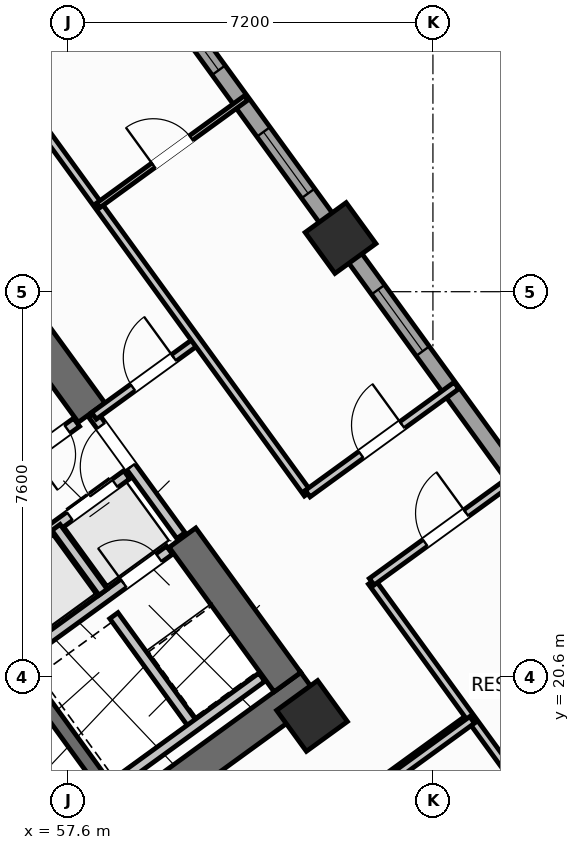
"""IFC4 building model, lengths in metres.
Left out: names, types, materials, properties, quantities, classifications, styles, units other than length and angle.
Written with IfcOpenShell. Run it as: python <this file> out.ifc"""

import sys

from ifc_helpers import new_model, si_unit, direction, frame, frame_2d, origin, origin_2d, place, context, subcontext, project, spatial, rectangle, hollow_rectangle, extrude, source, transform, mapped, element, fill, save


model = new_model("IFC4")
c1 = context("Model", 3, precision=1e-05, world=origin(), true_north=direction((0.0, 1.0)))
c2 = subcontext(c1, "Body", "Model", "MODEL_VIEW")
j1 = project(units=[si_unit("LENGTHUNIT", "METRE"), si_unit("PLANEANGLEUNIT", "RADIAN")], contexts=[c1])
p1 = place(None, origin())
s1 = spatial("IfcSite", under=j1, at=p1, CompositionType="ELEMENT")
p2 = place(p1, origin())
s2 = spatial("IfcBuilding", under=s1, at=p2, CompositionType="ELEMENT")
p3 = place(p2, frame((0.0, 0.0, 49.2)))
s3 = spatial("IfcBuildingStorey", under=s2, at=p3, CompositionType="ELEMENT", Elevation=49.2)
p4 = place(p3, frame((52.318, 13.11, 0.0), z_axis=(0.0, 0.0, 1.0), x_axis=(0.809019445368, 0.587781878776, 0.0)))
e1 = element("IfcWall", 1, at=p4, inside=s3, PredefinedType="SHEAR", context=c2, shape_type="SweptSolid", body=[
    extrude(rectangle(XDim=12.44, YDim=0.65, at=frame_2d((6.22, 0.0))), origin(), (0.0, 0.0, 1.0), 3.35),
])
p5 = place(p3, frame((61.929, 20.494, 0.0), z_axis=(0.0, 0.0, 1.0), x_axis=(-0.58782982593, 0.808984607855, 0.0)))
e2 = element("IfcWall", 2, at=p5, inside=s3, PredefinedType="SHEAR", context=c2, shape_type="SweptSolid", body=[
    extrude(rectangle(XDim=3.525, YDim=0.65, at=frame_2d((1.762, 0.0))), origin(), (0.0, 0.0, 1.0), 3.35),
])
p6 = place(p3, frame((58.064, 25.813, 0.0), z_axis=(0.0, 0.0, 1.0), x_axis=(-0.58777996584, 0.809020835181, 0.0)))
e3 = element("IfcWall", 3, at=p6, inside=s3, PredefinedType="SHEAR", context=c2, shape_type="SweptSolid", body=[
    extrude(rectangle(XDim=6.375, YDim=0.65, at=frame_2d((3.188, 0.0))), origin(), (0.0, 0.0, 1.0), 3.35),
])
m1 = source(origin(), c2, "Body", "SweptSolid", [
    extrude(hollow_rectangle(XDim=1.0, YDim=1.0, WallThickness=0.04, at=origin_2d()), origin(), (0.0, 0.0, 1.0), 3.6),
])
for number, where, z_axis, x_axis in (
    (4, (62.414, 19.827, 0.0), (0.0, 0.0, 1.0), (0.809, 0.588, 0.0)),
    (5, (62.977, 29.259, 0.0), (0.0, 0.0, 1.0), (0.809, 0.588, 0.0)),
):
    element("IfcColumn", number, at=place(p3, frame(where, z_axis=z_axis, x_axis=x_axis)), inside=s3, PredefinedType="COLUMN", context=c2, shape_type="MappedRepresentation", body=[
        mapped(m1, transform((0.0, 0.0, 0.0), scale=1.0)),
    ])
p7 = place(p3, frame((43.938, 25.192, 0.0), z_axis=(0.0, 0.0, 1.0), x_axis=(0.809016324578, 0.587786174187, 0.0)))
e6 = element("IfcWall", 6, at=p7, inside=s3, PredefinedType="STANDARD", context=c2, shape_type="SweptSolid", body=[
    extrude(rectangle(XDim=17.587, YDim=0.32, at=frame_2d((8.794, 0.0))), origin(), (0.0, 0.0, 1.0), 3.35),
])
p8 = place(p7, frame((14.914, 0.0, 0.0)))
e7 = element("IfcOpeningElement", 7, at=p8, cuts=e6, PredefinedType="OPENING", context=c2, shape_type="SweptSolid", body=[
    extrude(rectangle(XDim=1.05, YDim=2.15, at=frame_2d((0.525, 1.075))), frame((0.0, 0.17, 0.0), z_axis=(0.0, -1.0, 0.0), x_axis=(1.0, 0.0, 0.0)), (0.0, 0.0, 1.0), 0.34),
])
p9 = place(p7, frame((2.169, 0.0, 0.8)))
e8 = element("IfcOpeningElement", 8, at=p9, cuts=e6, PredefinedType="OPENING", context=c2, shape_type="SweptSolid", body=[
    extrude(rectangle(XDim=2.1, YDim=1.55, at=frame_2d((1.05, 0.775))), frame((0.0, 0.17, 0.0), z_axis=(0.0, -1.0, 0.0), x_axis=(1.0, 0.0, 0.0)), (0.0, 0.0, 1.0), 0.34),
])
p10 = place(p7, frame((7.319, 0.0, 0.8)))
e9 = element("IfcOpeningElement", 9, at=p10, cuts=e6, PredefinedType="OPENING", context=c2, shape_type="SweptSolid", body=[
    extrude(rectangle(XDim=2.1, YDim=1.55, at=frame_2d((1.05, 0.775))), frame((0.0, 0.17, 0.0), z_axis=(0.0, -1.0, 0.0), x_axis=(1.0, 0.0, 0.0)), (0.0, 0.0, 1.0), 0.34),
])
p11 = place(p3, frame((58.455, 35.484, 0.0), z_axis=(0.0, 0.0, 1.0), x_axis=(0.587783625747, -0.809018176127, 0.0)))
e10 = element("IfcWall", 10, at=p11, inside=s3, PredefinedType="STANDARD", context=c2, shape_type="SweptSolid", body=[
    extrude(rectangle(XDim=21.587, YDim=0.32, at=frame_2d((10.794, 0.0))), origin(), (0.0, 0.0, 1.0), 2.725),
])
p12 = place(p11, frame((1.5, 0.0, 0.8)))
e11 = element("IfcOpeningElement", 11, at=p12, cuts=e10, PredefinedType="OPENING", context=c2, shape_type="SweptSolid", body=[
    extrude(rectangle(XDim=2.1, YDim=1.55, at=frame_2d((1.05, 0.775))), frame((0.0, 0.17, 0.0), z_axis=(0.0, -1.0, 0.0), x_axis=(1.0, 0.0, 0.0)), (0.0, 0.0, 1.0), 0.34),
])
p13 = place(p11, frame((5.105, 0.0, 0.85)))
e12 = element("IfcOpeningElement", 12, at=p13, cuts=e10, PredefinedType="OPENING", context=c2, shape_type="SweptSolid", body=[
    extrude(rectangle(XDim=1.5, YDim=1.5, at=frame_2d((0.75, 0.75))), frame((0.0, 0.17, 0.0), z_axis=(0.0, -1.0, 0.0), x_axis=(1.0, 0.0, 0.0)), (0.0, 0.0, 1.0), 0.34),
])
p14 = place(p11, frame((8.954, 0.0, 0.85)))
e13 = element("IfcOpeningElement", 13, at=p14, cuts=e10, PredefinedType="OPENING", context=c2, shape_type="SweptSolid", body=[
    extrude(rectangle(XDim=1.5, YDim=1.5, at=frame_2d((0.75, 0.75))), frame((0.0, 0.17, 0.0), z_axis=(0.0, -1.0, 0.0), x_axis=(1.0, 0.0, 0.0)), (0.0, 0.0, 1.0), 0.34),
])
p15 = place(p11, frame((17.581, 0.0, 0.95)))
e14 = element("IfcOpeningElement", 14, at=p15, cuts=e10, PredefinedType="OPENING", context=c2, shape_type="SweptSolid", body=[
    extrude(rectangle(XDim=1.2, YDim=1.4, at=frame_2d((0.6, 0.7))), frame((0.0, 0.17, 0.0), z_axis=(0.0, -1.0, 0.0), x_axis=(1.0, 0.0, 0.0)), (0.0, 0.0, 1.0), 0.34),
])
p16 = place(p3, frame((58.41, 18.327, 0.0), z_axis=(0.0, 0.0, 1.0), x_axis=(-0.58776738483, 0.809029975545, 0.0)))
e15 = element("IfcWall", 15, at=p16, inside=s3, PredefinedType="SHEAR", context=c2, shape_type="SweptSolid", body=[
    extrude(rectangle(XDim=3.16, YDim=0.26, at=frame_2d((1.58, 0.0))), origin(), (0.0, 0.0, 1.0), 3.35),
])
p17 = place(p3, frame((56.553, 20.884, 0.0), z_axis=(0.0, 0.0, 1.0), x_axis=(0.809035789462, 0.587759382205, 0.0)))
e16 = element("IfcWall", 16, at=p17, inside=s3, PredefinedType="STANDARD", context=c2, shape_type="SweptSolid", body=[
    extrude(rectangle(XDim=3.768, YDim=0.2, at=frame_2d((1.884, 0.0))), origin(), (0.0, 0.0, 1.0), 3.34),
])
p18 = place(p17, frame((2.65, 0.0, 0.0)))
e17 = element("IfcOpeningElement", 17, at=p18, cuts=e16, PredefinedType="OPENING", context=c2, shape_type="SweptSolid", body=[
    extrude(rectangle(XDim=0.86, YDim=2.05, at=frame_2d((0.43, 1.025))), frame((0.0, 0.11, 0.0), z_axis=(0.0, -1.0, 0.0), x_axis=(1.0, 0.0, 0.0)), (0.0, 0.0, 1.0), 0.22),
])
p19 = place(p3, frame((54.421, 21.436, 0.0), z_axis=(0.0, 0.0, 1.0), x_axis=(0.809013710463, 0.587789772183, 0.0)))
e18 = element("IfcWall", 18, at=p19, inside=s3, PredefinedType="STANDARD", context=c2, shape_type="SweptSolid", body=[
    extrude(rectangle(XDim=5.36, YDim=0.2, at=frame_2d((2.68, 0.0))), origin(), (0.0, 0.0, 1.0), 3.34),
])
p20 = place(p19, frame((0.37, 0.0, 0.0)))
e19 = element("IfcOpeningElement", 19, at=p20, cuts=e18, PredefinedType="OPENING", context=c2, shape_type="SweptSolid", body=[
    extrude(rectangle(XDim=1.1, YDim=2.15, at=frame_2d((0.55, 1.075))), frame((0.0, 0.11, 0.0), z_axis=(0.0, -1.0, 0.0), x_axis=(1.0, 0.0, 0.0)), (0.0, 0.0, 1.0), 0.22),
])
p21 = place(p19, frame((2.17, 0.0, 0.0)))
e20 = element("IfcOpeningElement", 20, at=p21, cuts=e18, PredefinedType="OPENING", context=c2, shape_type="SweptSolid", body=[
    extrude(rectangle(XDim=1.1, YDim=2.15, at=frame_2d((0.55, 1.075))), frame((0.0, 0.11, 0.0), z_axis=(0.0, -1.0, 0.0), x_axis=(1.0, 0.0, 0.0)), (0.0, 0.0, 1.0), 0.22),
])
p22 = place(p19, frame((3.97, 0.0, 0.0)))
e21 = element("IfcOpeningElement", 21, at=p22, cuts=e18, PredefinedType="OPENING", context=c2, shape_type="SweptSolid", body=[
    extrude(rectangle(XDim=1.1, YDim=2.15, at=frame_2d((0.55, 1.075))), frame((0.0, 0.11, 0.0), z_axis=(0.0, -1.0, 0.0), x_axis=(1.0, 0.0, 0.0)), (0.0, 0.0, 1.0), 0.22),
])
p23 = place(p3, frame((58.29, 22.27, 0.0), z_axis=(0.0, 0.0, 1.0), x_axis=(-0.587840865826, 0.808976585857, 0.0)))
e22 = element("IfcWall", 22, at=p23, inside=s3, PredefinedType="STANDARD", context=c2, shape_type="SweptSolid", body=[
    extrude(rectangle(XDim=1.58, YDim=0.2, at=frame_2d((0.79, 0.0))), origin(), (0.0, 0.0, 1.0), 3.34),
])
p24 = place(p3, frame((60.067, 19.655, 0.0), z_axis=(0.0, 0.0, 1.0), x_axis=(-0.587800520745, 0.809005900975, 0.0)))
e23 = element("IfcWall", 23, at=p24, inside=s3, PredefinedType="STANDARD", context=c2, shape_type="SweptSolid", body=[
    extrude(rectangle(XDim=2.66, YDim=0.2, at=frame_2d((1.33, 0.0))), origin(), (0.0, 0.0, 1.0), 3.34),
])
p25 = place(p3, frame((58.472, 18.447, 0.0), z_axis=(0.0, 0.0, 1.0), x_axis=(0.809022487728, 0.587777691266, 0.0)))
e24 = element("IfcWall", 24, at=p25, inside=s3, PredefinedType="STANDARD", context=c2, shape_type="SweptSolid", body=[
    extrude(rectangle(XDim=3.648, YDim=0.2, at=frame_2d((1.824, 0.0))), origin(), (0.0, 0.0, 1.0), 3.34),
])
p26 = place(p3, frame((53.425, 22.468, 0.0), z_axis=(0.0, 0.0, 1.0), x_axis=(0.80902705128, 0.587771409902, 0.0)))
e25 = element("IfcWall", 25, at=p26, inside=s3, PredefinedType="STANDARD", context=c2, shape_type="SweptSolid", body=[
    extrude(rectangle(XDim=5.368, YDim=0.2, at=frame_2d((2.684, 0.0))), origin(), (0.0, 0.0, 1.0), 3.34),
])
p27 = place(p26, frame((4.28, 0.0, 0.0)))
e26 = element("IfcOpeningElement", 26, at=p27, cuts=e25, PredefinedType="OPENING", context=c2, shape_type="SweptSolid", body=[
    extrude(rectangle(XDim=0.86, YDim=2.05, at=frame_2d((0.43, 1.025))), frame((0.0, 0.11, 0.0), z_axis=(0.0, -1.0, 0.0), x_axis=(1.0, 0.0, 0.0)), (0.0, 0.0, 1.0), 0.22),
])
p28 = place(p26, frame((1.45, 0.0, 0.0)))
e27 = element("IfcOpeningElement", 27, at=p28, cuts=e25, PredefinedType="OPENING", context=c2, shape_type="SweptSolid", body=[
    extrude(rectangle(XDim=0.86, YDim=2.05, at=frame_2d((0.43, 1.025))), frame((0.0, 0.11, 0.0), z_axis=(0.0, -1.0, 0.0), x_axis=(1.0, 0.0, 0.0)), (0.0, 0.0, 1.0), 0.22),
])
p29 = place(p3, frame((59.827, 23.386, 0.0), z_axis=(0.0, 0.0, 1.0), x_axis=(-0.587803840107, 0.809003489211, 0.0)))
e28 = element("IfcWall", 28, at=p29, inside=s3, PredefinedType="STANDARD", context=c2, shape_type="SweptSolid", body=[
    extrude(rectangle(XDim=2.96, YDim=0.2, at=frame_2d((1.48, 0.0))), origin(), (0.0, 0.0, 1.0), 3.34),
])
p30 = place(p29, frame((1.68, 0.0, 0.0)))
e29 = element("IfcOpeningElement", 29, at=p30, cuts=e28, PredefinedType="OPENING", context=c2, shape_type="SweptSolid", body=[
    extrude(rectangle(XDim=1.0, YDim=2.1, at=frame_2d((0.5, 1.05))), frame((0.0, 0.11, 0.0), z_axis=(0.0, -1.0, 0.0), x_axis=(1.0, 0.0, 0.0)), (0.0, 0.0, 1.0), 0.22),
])
p31 = place(p3, frame((63.507, 18.322, 0.0), z_axis=(0.0, 0.0, 1.0), x_axis=(0.809034604122, 0.587761013791, 0.0)))
e30 = element("IfcWall", 30, at=p31, inside=s3, PredefinedType="PARTITIONING", context=c2, shape_type="SweptSolid", body=[
    extrude(rectangle(XDim=2.51, YDim=0.16, at=frame_2d((1.255, 0.0))), origin(), (0.0, 0.0, 1.0), 3.34),
])
p32 = place(p3, frame((58.111, 25.749, 0.0), z_axis=(0.0, 0.0, 1.0), x_axis=(0.809000999347, 0.58780726693, 0.0)))
e31 = element("IfcWall", 31, at=p32, inside=s3, PredefinedType="PARTITIONING", context=c2, shape_type="SweptSolid", body=[
    extrude(rectangle(XDim=2.51, YDim=0.16, at=frame_2d((1.255, 0.0))), origin(), (0.0, 0.0, 1.0), 2.725),
])
p33 = place(p32, frame((0.95, 0.0, 0.0)))
e32 = element("IfcOpeningElement", 32, at=p33, cuts=e31, PredefinedType="OPENING", context=c2, shape_type="SweptSolid", body=[
    extrude(rectangle(XDim=1.0, YDim=2.1, at=frame_2d((0.5, 1.05))), frame((0.0, 0.09, 0.0), z_axis=(0.0, -1.0, 0.0), x_axis=(1.0, 0.0, 0.0)), (0.0, 0.0, 1.0), 0.18),
])
p34 = place(p3, frame((68.353, 15.922, 0.0), z_axis=(0.0, 0.0, 1.0), x_axis=(-0.58776839458, 0.809029241952, 0.0)))
e33 = element("IfcWall", 33, at=p34, inside=s3, PredefinedType="PARTITIONING", context=c2, shape_type="SweptSolid", body=[
    extrude(rectangle(XDim=8.1, YDim=0.16, at=frame_2d((4.05, 0.0))), origin(), (0.0, 0.0, 1.0), 3.34),
])
p35 = place(p3, frame((62.328, 24.215, 0.0), z_axis=(0.0, 0.0, 1.0), x_axis=(-0.587778600963, 0.809021826807, 0.0)))
e34 = element("IfcWall", 34, at=p35, inside=s3, PredefinedType="PARTITIONING", context=c2, shape_type="SweptSolid", body=[
    extrude(rectangle(XDim=11.45, YDim=0.16, at=frame_2d((5.725, 0.0))), origin(), (0.0, 0.0, 1.0), 3.34),
])
p36 = place(p3, frame((63.592, 22.475, 0.0), z_axis=(0.0, 0.0, 1.0), x_axis=(0.809035546126, 0.58775971715, 0.0)))
e35 = element("IfcWall", 35, at=p36, inside=s3, PredefinedType="PARTITIONING", context=c2, shape_type="SweptSolid", body=[
    extrude(rectangle(XDim=3.63, YDim=0.16, at=frame_2d((1.815, 0.0))), origin(), (0.0, 0.0, 1.0), 3.34),
])
p37 = place(p36, frame((1.305, 0.0, 0.0)))
e36 = element("IfcOpeningElement", 36, at=p37, cuts=e35, PredefinedType="OPENING", context=c2, shape_type="SweptSolid", body=[
    extrude(rectangle(XDim=1.0, YDim=2.1, at=frame_2d((0.5, 1.05))), frame((0.0, 0.09, 0.0), z_axis=(0.0, -1.0, 0.0), x_axis=(1.0, 0.0, 0.0)), (0.0, 0.0, 1.0), 0.18),
])
p38 = place(p3, frame((62.328, 24.215, 0.0), z_axis=(0.0, 0.0, 1.0), x_axis=(0.809003564202, 0.587803736896, 0.0)))
e37 = element("IfcWall", 37, at=p38, inside=s3, PredefinedType="PARTITIONING", context=c2, shape_type="SweptSolid", body=[
    extrude(rectangle(XDim=3.63, YDim=0.16, at=frame_2d((1.815, 0.0))), origin(), (0.0, 0.0, 1.0), 3.34),
])
p39 = place(p38, frame((1.305, 0.0, 0.0)))
e38 = element("IfcOpeningElement", 38, at=p39, cuts=e37, PredefinedType="OPENING", context=c2, shape_type="SweptSolid", body=[
    extrude(rectangle(XDim=1.0, YDim=2.1, at=frame_2d((0.5, 1.05))), frame((0.0, 0.09, 0.0), z_axis=(0.0, -1.0, 0.0), x_axis=(1.0, 0.0, 0.0)), (0.0, 0.0, 1.0), 0.18),
])
p40 = place(p3, frame((58.195, 29.904, 0.0), z_axis=(0.0, 0.0, 1.0), x_axis=(0.809005039917, 0.58780170584, 0.0)))
e39 = element("IfcWall", 39, at=p40, inside=s3, PredefinedType="PARTITIONING", context=c2, shape_type="SweptSolid", body=[
    extrude(rectangle(XDim=3.61, YDim=0.11, at=frame_2d((1.805, 0.0))), origin(), (0.0, 0.0, 1.0), 3.34),
])
p41 = place(p40, frame((1.345, 0.0, 0.0)))
e40 = element("IfcOpeningElement", 40, at=p41, cuts=e39, PredefinedType="OPENING", context=c2, shape_type="SweptSolid", body=[
    extrude(rectangle(XDim=0.92, YDim=2.08, at=frame_2d((0.46, 1.04))), frame((0.0, 0.065, 0.0), z_axis=(0.0, -1.0, 0.0), x_axis=(1.0, 0.0, 0.0)), (0.0, 0.0, 1.0), 0.13),
])
p42 = place(p3, frame((53.705, 11.126, 0.0), z_axis=(0.0, 0.0, 1.0), x_axis=(0.809014504436, 0.587788679384, 0.0)))
e41 = element("IfcWall", 41, at=p42, inside=s3, PredefinedType="PARTITIONING", context=c2, shape_type="SweptSolid", body=[
    extrude(rectangle(XDim=14.67, YDim=0.16, at=frame_2d((7.335, 0.0))), origin(), (0.0, 0.0, 1.0), 3.34),
])
p43 = place(p42, frame((10.2, 0.0, 0.0)))
e42 = element("IfcOpeningElement", 42, at=p43, cuts=e41, PredefinedType="OPENING", context=c2, shape_type="SweptSolid", body=[
    extrude(rectangle(XDim=1.0, YDim=2.1, at=frame_2d((0.5, 1.05))), frame((0.0, 0.09, 0.0), z_axis=(0.0, -1.0, 0.0), x_axis=(1.0, 0.0, 0.0)), (0.0, 0.0, 1.0), 0.18),
])
m2 = source(origin(), c2, "Body", "SweptSolid", [
    extrude(rectangle(XDim=2.1, YDim=1.55, at=frame_2d((1.05, 0.775))), frame((0.0, 0.03, 0.0), z_axis=(0.0, -1.0, 0.0), x_axis=(1.0, 0.0, 0.0)), (0.0, 0.0, 1.0), 0.06),
])
p44 = place(p12, origin())
e43 = element("IfcWindow", 43, at=p44, inside=s3, PartitioningType="SINGLE_PANEL", PredefinedType="WINDOW", context=c2, shape_type="MappedRepresentation", body=[
    mapped(m2, transform((0.0, 0.0, 0.0), scale=1.0)),
])
fill(e11, e43)
m3 = source(origin(), c2, "Body", "SweptSolid", [
    extrude(rectangle(XDim=1.5, YDim=1.5, at=frame_2d((0.75, 0.75))), frame((0.0, 0.03, 0.0), z_axis=(0.0, -1.0, 0.0), x_axis=(1.0, 0.0, 0.0)), (0.0, 0.0, 1.0), 0.06),
])
p45 = place(p13, origin())
e44 = element("IfcWindow", 44, at=p45, inside=s3, PartitioningType="SINGLE_PANEL", PredefinedType="WINDOW", context=c2, shape_type="MappedRepresentation", body=[
    mapped(m3, transform((0.0, 0.0, 0.0), scale=1.0)),
])
fill(e12, e44)
p46 = place(p14, origin())
e45 = element("IfcWindow", 45, at=p46, inside=s3, PartitioningType="SINGLE_PANEL", PredefinedType="WINDOW", context=c2, shape_type="MappedRepresentation", body=[
    mapped(m3, transform((0.0, 0.0, 0.0), scale=1.0)),
])
fill(e13, e45)
m4 = source(origin(), c2, "Body", "SweptSolid", [
    extrude(rectangle(XDim=1.1, YDim=2.15, at=frame_2d((0.55, 1.075))), frame((0.0, 0.025, 0.0), z_axis=(0.0, -1.0, 0.0), x_axis=(1.0, 0.0, 0.0)), (0.0, 0.0, 1.0), 0.05),
])
p47 = place(p22, origin())
e46 = element("IfcDoor", 46, at=p47, inside=s3, OperationType="DOUBLE_DOOR_SLIDING", PredefinedType="DOOR", context=c2, shape_type="MappedRepresentation", body=[
    mapped(m4, transform((0.0, 0.0, 0.0), scale=1.0)),
])
fill(e21, e46)
m5 = source(origin(), c2, "Body", "SweptSolid", [
    extrude(rectangle(XDim=0.86, YDim=2.05, at=frame_2d((0.43, 1.025))), frame((0.0, 0.025, 0.0), z_axis=(0.0, -1.0, 0.0), x_axis=(1.0, 0.0, 0.0)), (0.0, 0.0, 1.0), 0.05),
])
p48 = place(p18, origin())
e47 = element("IfcDoor", 47, at=p48, inside=s3, OperationType="SINGLE_SWING_LEFT", PredefinedType="DOOR", context=c2, shape_type="MappedRepresentation", body=[
    mapped(m5, transform((0.0, 0.0, 0.0), scale=1.0)),
])
fill(e17, e47)
p49 = place(p27, frame((0.86, 0.0, 0.0), z_axis=(0.0, 0.0, 1.0), x_axis=(-1.0, 0.0, 0.0)))
e48 = element("IfcDoor", 48, at=p49, inside=s3, OperationType="SINGLE_SWING_RIGHT", PredefinedType="DOOR", context=c2, shape_type="MappedRepresentation", body=[
    mapped(m5, transform((0.0, 0.0, 0.0), scale=1.0)),
])
fill(e26, e48)
m6 = source(origin(), c2, "Body", "SweptSolid", [
    extrude(rectangle(XDim=1.0, YDim=2.1, at=frame_2d((0.5, 1.05))), frame((0.0, 0.025, 0.0), z_axis=(0.0, -1.0, 0.0), x_axis=(1.0, 0.0, 0.0)), (0.0, 0.0, 1.0), 0.05),
])
p50 = place(p33, origin())
e49 = element("IfcDoor", 49, at=p50, inside=s3, OperationType="SINGLE_SWING_RIGHT", PredefinedType="DOOR", context=c2, shape_type="MappedRepresentation", body=[
    mapped(m6, transform((0.0, 0.0, 0.0), scale=1.0)),
])
fill(e32, e49)
p51 = place(p30, origin())
e50 = element("IfcDoor", 50, at=p51, inside=s3, OperationType="SINGLE_SWING_LEFT", PredefinedType="DOOR", context=c2, shape_type="MappedRepresentation", body=[
    mapped(m6, transform((0.0, 0.0, 0.0), scale=1.0)),
])
fill(e29, e50)
p52 = place(p39, origin())
e51 = element("IfcDoor", 51, at=p52, inside=s3, OperationType="SINGLE_SWING_RIGHT", PredefinedType="DOOR", context=c2, shape_type="MappedRepresentation", body=[
    mapped(m6, transform((0.0, 0.0, 0.0), scale=1.0)),
])
fill(e38, e51)
m7 = source(origin(), c2, "Body", "SweptSolid", [
    extrude(rectangle(XDim=0.92, YDim=2.08, at=frame_2d((0.46, 1.04))), frame((0.0, 0.025, 0.0), z_axis=(0.0, -1.0, 0.0), x_axis=(1.0, 0.0, 0.0)), (0.0, 0.0, 1.0), 0.05),
])
p53 = place(p41, origin())
e52 = element("IfcDoor", 52, at=p53, inside=s3, OperationType="SINGLE_SWING_LEFT", PredefinedType="DOOR", context=c2, shape_type="MappedRepresentation", body=[
    mapped(m7, transform((0.0, 0.0, 0.0), scale=1.0)),
])
fill(e40, e52)
p54 = place(p37, origin())
e53 = element("IfcDoor", 53, at=p54, inside=s3, OperationType="SINGLE_SWING_RIGHT", PredefinedType="DOOR", context=c2, shape_type="MappedRepresentation", body=[
    mapped(m6, transform((0.0, 0.0, 0.0), scale=1.0)),
])
fill(e36, e53)
save(model, sys.argv[1])
